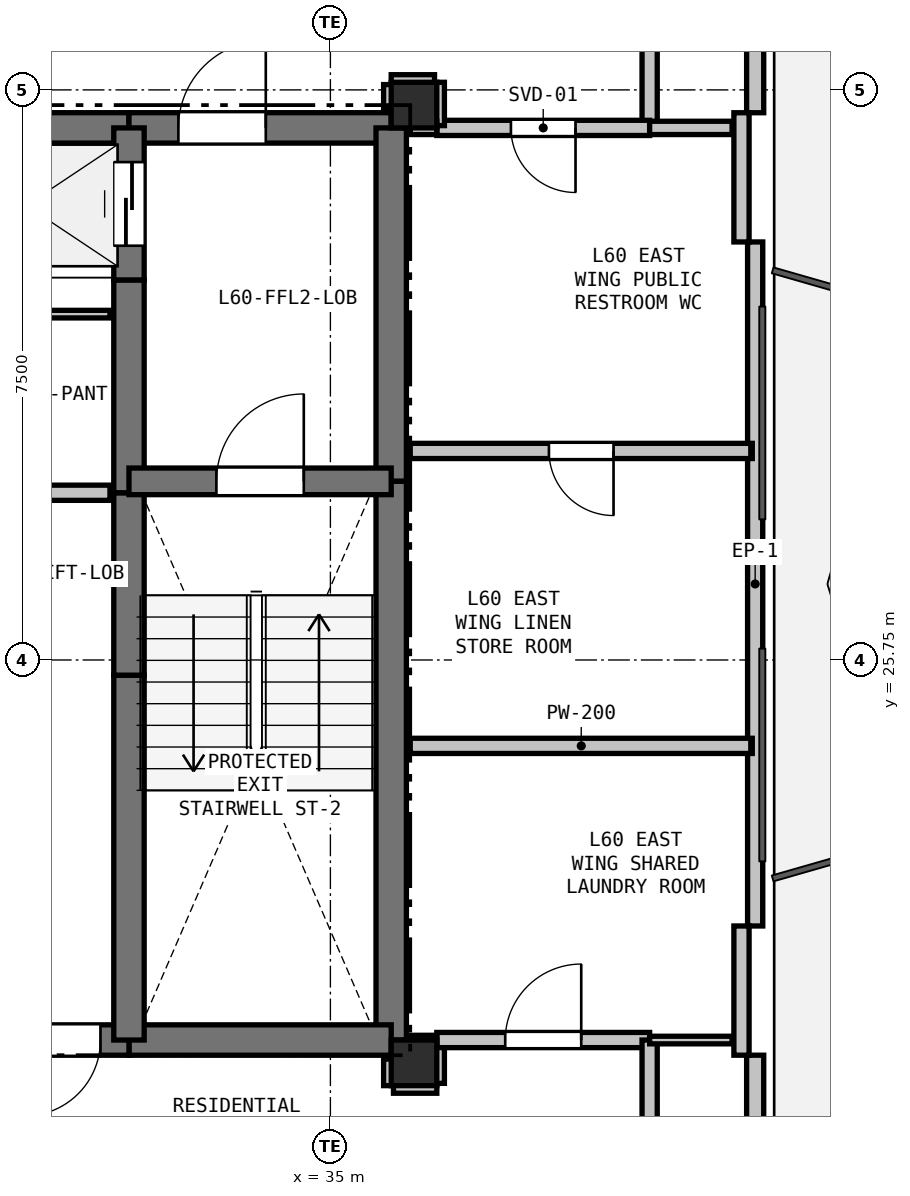
"""IFC4 building model, lengths in metres.
Left out: names, types, materials, properties, quantities, classifications, styles, units other than length and angle.
Written with IfcOpenShell. Run it as: python <this file> out.ifc"""

import sys

from ifc_helpers import new_model, si_unit, direction, frame, frame_2d, origin, origin_2d, place, context, subcontext, project, spatial, rectangle, extrude, element, fill, save


model = new_model("IFC4")
c1 = context("Model", 3, precision=1e-05, world=origin(), true_north=direction((0.0, 1.0)))
c2 = subcontext(c1, "Body", "Model", "MODEL_VIEW")
j1 = project(units=[si_unit("LENGTHUNIT", "METRE"), si_unit("PLANEANGLEUNIT", "RADIAN")], contexts=[c1])
p1 = place(None, origin())
s1 = spatial("IfcSite", under=j1, at=p1, CompositionType="ELEMENT")
p2 = place(p1, origin())
s2 = spatial("IfcBuilding", under=s1, at=p2, CompositionType="ELEMENT")
p3 = place(p2, frame((0.0, 0.0, 215.1)))
s3 = spatial("IfcBuildingStorey", under=s2, at=p3, CompositionType="ELEMENT", Elevation=215.1)
for number, where, z_axis, x_axis in (
    (1, (36.1, 33.05, 0.0), (0.0, 0.0, 1.0), (1.0, 0.0, 0.0)),
    (2, (36.1, 20.45, 0.0), (0.0, 0.0, 1.0), (1.0, 0.0, 0.0)),
):
    element("IfcColumn", number, at=place(p3, frame(where, z_axis=z_axis, x_axis=x_axis)), inside=s3, PredefinedType="COLUMN", context=c2, shape_type="SweptSolid", body=[
        extrude(rectangle(XDim=0.6, YDim=0.6, at=origin_2d()), origin(), (0.0, 0.0, 1.0), 3.3),
    ])
p4 = place(p3, frame((40.588, 42.648, 0.0), z_axis=(0.0, 0.0, 1.0), x_axis=(0.0, -1.0, 0.0)))
e3 = element("IfcWall", 3, at=p4, inside=s3, PredefinedType="SOLIDWALL", context=c2, shape_type="SweptSolid", body=[
    extrude(rectangle(XDim=9.699, YDim=0.225, at=frame_2d((4.85, 0.0))), origin(), (0.0, 0.0, 1.0), 2.64),
])
p5 = place(p4, frame((7.784, 0.0, 0.0)))
e4 = element("IfcOpeningElement", 4, at=p5, cuts=e3, PredefinedType="OPENING", context=c2, shape_type="SweptSolid", body=[
    extrude(rectangle(XDim=1.0, YDim=2.1, at=frame_2d((0.5, 1.05))), frame((0.0, 0.123, 0.0), z_axis=(0.0, -1.0, 0.0), x_axis=(1.0, 0.0, 0.0)), (0.0, 0.0, 1.0), 0.245),
])
p6 = place(p3, frame((40.588, 31.25, 0.0), z_axis=(0.0, 0.0, 1.0), x_axis=(0.0, -1.0, 0.0)))
e5 = element("IfcWall", 5, at=p6, inside=s3, PredefinedType="PARAPET", context=c2, shape_type="SweptSolid", body=[
    extrude(rectangle(XDim=8.999, YDim=0.2, at=frame_2d((4.5, 0.0))), origin(), (0.0, 0.0, 1.0), 0.2),
])
p7 = place(p3, frame((40.588, 20.551, 0.0), z_axis=(0.0, 0.0, 1.0), x_axis=(0.0, -1.0, 0.0)))
e6 = element("IfcWall", 6, at=p7, inside=s3, PredefinedType="SOLIDWALL", context=c2, shape_type="SweptSolid", body=[
    extrude(rectangle(XDim=9.699, YDim=0.225, at=frame_2d((4.85, 0.0))), origin(), (0.0, 0.0, 1.0), 2.64),
])
p8 = place(p7, frame((6.395, 0.0, 0.9)))
e7 = element("IfcOpeningElement", 7, at=p8, cuts=e6, PredefinedType="OPENING", context=c2, shape_type="SweptSolid", body=[
    extrude(rectangle(XDim=1.5, YDim=1.5, at=frame_2d((0.75, 0.75))), frame((0.0, 0.123, 0.0), z_axis=(0.0, -1.0, 0.0), x_axis=(1.0, 0.0, 0.0)), (0.0, 0.0, 1.0), 0.245),
])
for number, where, z_axis, x_axis in (
    (8, (40.408, 32.949, 0.0), (0.0, 0.0, 1.0), (0.0, -1.0, 0.0)),
    (9, (40.408, 22.25, 0.0), (0.0, 0.0, 1.0), (0.0, -1.0, 0.0)),
):
    element("IfcWall", number, at=place(p3, frame(where, z_axis=z_axis, x_axis=x_axis)), inside=s3, PredefinedType="PARAPET", context=c2, shape_type="SweptSolid", body=[
        extrude(rectangle(XDim=1.7, YDim=0.2, at=frame_2d((0.85, 0.0))), origin(), (0.0, 0.0, 1.0), 2.64),
    ])
p9 = place(p3, frame((29.65, 32.75, 0.0), z_axis=(0.0, 0.0, 1.0), x_axis=(1.0, 0.0, 0.0)))
e10 = element("IfcWall", 10, at=p9, inside=s3, PredefinedType="SHEAR", context=c2, shape_type="SweptSolid", body=[
    extrude(rectangle(XDim=2.7, YDim=0.4, at=frame_2d((1.35, 0.0))), origin(), (0.0, 0.0, 1.0), 3.02),
])
p10 = place(p3, frame((32.35, 32.75, 0.0), z_axis=(0.0, 0.0, 1.0), x_axis=(1.0, 0.0, 0.0)))
e11 = element("IfcWall", 11, at=p10, inside=s3, PredefinedType="SHEAR", context=c2, shape_type="SweptSolid", body=[
    extrude(rectangle(XDim=3.45, YDim=0.4, at=frame_2d((1.725, 0.0))), origin(), (0.0, 0.0, 1.0), 3.02),
])
p11 = place(p10, frame((0.65, 0.0, 0.0)))
e12 = element("IfcOpeningElement", 12, at=p11, cuts=e11, PredefinedType="OPENING", context=c2, shape_type="SweptSolid", body=[
    extrude(rectangle(XDim=1.15, YDim=2.15, at=frame_2d((0.575, 1.075))), frame((0.0, 0.21, 0.0), z_axis=(0.0, -1.0, 0.0), x_axis=(1.0, 0.0, 0.0)), (0.0, 0.0, 1.0), 0.42),
])
p12 = place(p3, frame((35.8, 32.75, 0.0), z_axis=(0.0, 0.0, 1.0), x_axis=(0.0, -1.0, 0.0)))
e13 = element("IfcWall", 13, at=p12, inside=s3, PredefinedType="SHEAR", context=c2, shape_type="SweptSolid", body=[
    extrude(rectangle(XDim=4.65, YDim=0.4, at=frame_2d((2.325, 0.0))), origin(), (0.0, 0.0, 1.0), 3.02),
])
p13 = place(p3, frame((35.8, 28.1, 0.0), z_axis=(0.0, 0.0, 1.0), x_axis=(0.0, -1.0, 0.0)))
e14 = element("IfcWall", 14, at=p13, inside=s3, PredefinedType="SHEAR", context=c2, shape_type="SweptSolid", body=[
    extrude(rectangle(XDim=7.35, YDim=0.4, at=frame_2d((3.675, 0.0))), origin(), (0.0, 0.0, 1.0), 3.02),
])
p14 = place(p3, frame((35.8, 20.75, 0.0), z_axis=(0.0, 0.0, 1.0), x_axis=(-1.0, 0.0, 0.0)))
e15 = element("IfcWall", 15, at=p14, inside=s3, PredefinedType="SHEAR", context=c2, shape_type="SweptSolid", body=[
    extrude(rectangle(XDim=3.45, YDim=0.4, at=frame_2d((1.725, 0.0))), origin(), (0.0, 0.0, 1.0), 3.02),
])
p15 = place(p3, frame((32.35, 20.75, 0.0), z_axis=(0.0, 0.0, 1.0), x_axis=(-1.0, 0.0, 0.0)))
e16 = element("IfcWall", 16, at=p15, inside=s3, PredefinedType="SHEAR", context=c2, shape_type="SweptSolid", body=[
    extrude(rectangle(XDim=1.75, YDim=0.4, at=frame_2d((0.875, 0.0))), origin(), (0.0, 0.0, 1.0), 3.02),
])
p16 = place(p15, frame((0.375, 0.0, 0.0)))
e17 = element("IfcOpeningElement", 17, at=p16, cuts=e16, PredefinedType="OPENING", context=c2, shape_type="SweptSolid", body=[
    extrude(rectangle(XDim=1.0, YDim=2.15, at=frame_2d((0.5, 1.075))), frame((0.0, 0.21, 0.0), z_axis=(0.0, -1.0, 0.0), x_axis=(1.0, 0.0, 0.0)), (0.0, 0.0, 1.0), 0.42),
])
p17 = place(p3, frame((32.35, 20.75, 0.0), z_axis=(0.0, 0.0, 1.0), x_axis=(0.0, 1.0, 0.0)))
e18 = element("IfcWall", 18, at=p17, inside=s3, PredefinedType="SHEAR", context=c2, shape_type="SweptSolid", body=[
    extrude(rectangle(XDim=4.8, YDim=0.4, at=frame_2d((2.4, 0.0))), origin(), (0.0, 0.0, 1.0), 3.02),
])
p18 = place(p3, frame((32.35, 25.55, 0.0), z_axis=(0.0, 0.0, 1.0), x_axis=(0.0, 1.0, 0.0)))
e19 = element("IfcWall", 19, at=p18, inside=s3, PredefinedType="SHEAR", context=c2, shape_type="SweptSolid", body=[
    extrude(rectangle(XDim=2.4, YDim=0.4, at=frame_2d((1.2, 0.0))), origin(), (0.0, 0.0, 1.0), 3.02),
])
p19 = place(p3, frame((32.35, 27.95, 0.0), z_axis=(0.0, 0.0, 1.0), x_axis=(0.0, 1.0, 0.0)))
e20 = element("IfcWall", 20, at=p19, inside=s3, PredefinedType="SHEAR", context=c2, shape_type="SweptSolid", body=[
    extrude(rectangle(XDim=2.8, YDim=0.4, at=frame_2d((1.4, 0.0))), origin(), (0.0, 0.0, 1.0), 3.02),
])
p20 = place(p3, frame((32.35, 30.75, 0.0), z_axis=(0.0, 0.0, 1.0), x_axis=(0.0, 1.0, 0.0)))
e21 = element("IfcWall", 21, at=p20, inside=s3, PredefinedType="SHEAR", context=c2, shape_type="SweptSolid", body=[
    extrude(rectangle(XDim=2.0, YDim=0.4, at=frame_2d((1.0, 0.0))), origin(), (0.0, 0.0, 1.0), 3.02),
])
p21 = place(p20, frame((0.45, 0.0, 0.0)))
e22 = element("IfcOpeningElement", 22, at=p21, cuts=e21, PredefinedType="OPENING", context=c2, shape_type="SweptSolid", body=[
    extrude(rectangle(XDim=1.1, YDim=2.15, at=frame_2d((0.55, 1.075))), frame((0.0, 0.21, 0.0), z_axis=(0.0, -1.0, 0.0), x_axis=(1.0, 0.0, 0.0)), (0.0, 0.0, 1.0), 0.42),
])
p22 = place(p3, frame((32.35, 28.1, 0.0), z_axis=(0.0, 0.0, 1.0), x_axis=(1.0, 0.0, 0.0)))
e23 = element("IfcWall", 23, at=p22, inside=s3, PredefinedType="SHEAR", context=c2, shape_type="SweptSolid", body=[
    extrude(rectangle(XDim=3.45, YDim=0.35, at=frame_2d((1.725, 0.0))), origin(), (0.0, 0.0, 1.0), 3.02),
])
p23 = place(p22, frame((1.15, 0.0, 0.0)))
e24 = element("IfcOpeningElement", 24, at=p23, cuts=e23, PredefinedType="OPENING", context=c2, shape_type="SweptSolid", body=[
    extrude(rectangle(XDim=1.15, YDim=2.15, at=frame_2d((0.575, 1.075))), frame((0.0, 0.185, 0.0), z_axis=(0.0, -1.0, 0.0), x_axis=(1.0, 0.0, 0.0)), (0.0, 0.0, 1.0), 0.37),
])
p24 = place(p3, frame((32.1, 30.3, 0.0), z_axis=(0.0, 0.0, 1.0), x_axis=(-1.0, 0.0, 0.0)))
e25 = element("IfcWall", 25, at=p24, inside=s3, PredefinedType="PARTITIONING", context=c2, shape_type="SweptSolid", body=[
    extrude(rectangle(XDim=2.45, YDim=0.1, at=frame_2d((1.225, 0.0))), origin(), (0.0, 0.0, 1.0), 3.02),
])
p25 = place(p3, frame((27.4, 27.95, 0.0), z_axis=(0.0, 0.0, 1.0), x_axis=(1.0, 0.0, 0.0)))
e26 = element("IfcWall", 26, at=p25, inside=s3, PredefinedType="PARTITIONING", context=c2, shape_type="SweptSolid", body=[
    extrude(rectangle(XDim=4.7, YDim=0.2, at=frame_2d((2.35, 0.0))), origin(), (0.0, 0.0, 1.0), 3.02),
])
p26 = place(p25, frame((1.85, 0.0, 0.0)))
e27 = element("IfcOpeningElement", 27, at=p26, cuts=e26, PredefinedType="OPENING", context=c2, shape_type="SweptSolid", body=[
    extrude(rectangle(XDim=1.0, YDim=2.15, at=frame_2d((0.5, 1.075))), frame((0.0, 0.11, 0.0), z_axis=(0.0, -1.0, 0.0), x_axis=(1.0, 0.0, 0.0)), (0.0, 0.0, 1.0), 0.22),
])
p27 = place(p3, frame((39.2, 35.2, 0.0), z_axis=(0.0, 0.0, 1.0), x_axis=(0.0, -1.0, 0.0)))
e28 = element("IfcWall", 28, at=p27, inside=s3, PredefinedType="PARTITIONING", context=c2, shape_type="SweptSolid", body=[
    extrude(rectangle(XDim=2.45, YDim=0.2, at=frame_2d((1.225, 0.0))), origin(), (0.0, 0.0, 1.0), 3.02),
])
p28 = place(p3, frame((39.2, 32.75, 0.0), z_axis=(0.0, 0.0, 1.0), x_axis=(-1.0, 0.0, 0.0)))
e29 = element("IfcWall", 29, at=p28, inside=s3, PredefinedType="PARTITIONING", context=c2, shape_type="SweptSolid", body=[
    extrude(rectangle(XDim=2.8, YDim=0.2, at=frame_2d((1.4, 0.0))), origin(), (0.0, 0.0, 1.0), 3.02),
])
p29 = place(p28, frame((0.975, 0.0, 0.0)))
e30 = element("IfcOpeningElement", 30, at=p29, cuts=e29, PredefinedType="OPENING", context=c2, shape_type="SweptSolid", body=[
    extrude(rectangle(XDim=0.85, YDim=2.1, at=frame_2d((0.425, 1.05))), frame((0.0, 0.11, 0.0), z_axis=(0.0, -1.0, 0.0), x_axis=(1.0, 0.0, 0.0)), (0.0, 0.0, 1.0), 0.22),
])
for number, where, z_axis, x_axis in (
    (31, (36.4, 32.78, 0.0), (0.0, 0.0, 1.0), (0.0, 1.0, 0.0)),
    (32, (36.37, 33.35, 0.0), (0.0, 0.0, 1.0), (-1.0, 0.0, 0.0)),
):
    element("IfcWall", number, at=place(p3, frame(where, z_axis=z_axis, x_axis=x_axis)), inside=s3, PredefinedType="PARTITIONING", context=c2, shape_type="SweptSolid", body=[
        extrude(rectangle(XDim=0.57, YDim=0.2, at=frame_2d((0.285, 0.0))), origin(), (0.0, 0.0, 1.0), 2.468),
    ])
p30 = place(p3, frame((35.8, 33.32, 0.0), z_axis=(0.0, 0.0, 1.0), x_axis=(0.0, -1.0, 0.0)))
e33 = element("IfcWall", 33, at=p30, inside=s3, PredefinedType="PARTITIONING", context=c2, shape_type="SweptSolid", body=[
    extrude(rectangle(XDim=0.32, YDim=0.2, at=frame_2d((0.16, 0.0))), origin(), (0.0, 0.0, 1.0), 2.545),
])
p31 = place(p3, frame((35.8, 20.5, 0.0), z_axis=(0.0, 0.0, 1.0), x_axis=(0.0, -1.0, 0.0)))
e34 = element("IfcWall", 34, at=p31, inside=s3, PredefinedType="PARTITIONING", context=c2, shape_type="SweptSolid", body=[
    extrude(rectangle(XDim=0.35, YDim=0.2, at=frame_2d((0.175, 0.0))), origin(), (0.0, 0.0, 1.0), 2.545),
])
p32 = place(p3, frame((35.83, 20.15, 0.0), z_axis=(0.0, 0.0, 1.0), x_axis=(1.0, 0.0, 0.0)))
e35 = element("IfcWall", 35, at=p32, inside=s3, PredefinedType="PARTITIONING", context=c2, shape_type="SweptSolid", body=[
    extrude(rectangle(XDim=0.57, YDim=0.2, at=frame_2d((0.285, 0.0))), origin(), (0.0, 0.0, 1.0), 2.468),
])
p33 = place(p3, frame((36.4, 20.18, 0.0), z_axis=(0.0, 0.0, 1.0), x_axis=(0.0, 1.0, 0.0)))
e36 = element("IfcWall", 36, at=p33, inside=s3, PredefinedType="PARTITIONING", context=c2, shape_type="SweptSolid", body=[
    extrude(rectangle(XDim=0.57, YDim=0.2, at=frame_2d((0.285, 0.0))), origin(), (0.0, 0.0, 1.0), 3.02),
])
p34 = place(p3, frame((36.4, 20.75, 0.0), z_axis=(0.0, 0.0, 1.0), x_axis=(1.0, 0.0, 0.0)))
e37 = element("IfcWall", 37, at=p34, inside=s3, PredefinedType="PARTITIONING", context=c2, shape_type="SweptSolid", body=[
    extrude(rectangle(XDim=2.8, YDim=0.2, at=frame_2d((1.4, 0.0))), origin(), (0.0, 0.0, 1.0), 3.02),
])
p35 = place(p34, frame((0.9, 0.0, 0.0)))
e38 = element("IfcOpeningElement", 38, at=p35, cuts=e37, PredefinedType="OPENING", context=c2, shape_type="SweptSolid", body=[
    extrude(rectangle(XDim=1.0, YDim=2.15, at=frame_2d((0.5, 1.075))), frame((0.0, 0.11, 0.0), z_axis=(0.0, -1.0, 0.0), x_axis=(1.0, 0.0, 0.0)), (0.0, 0.0, 1.0), 0.22),
])
p36 = place(p3, frame((39.2, 20.75, 0.0), z_axis=(0.0, 0.0, 1.0), x_axis=(0.0, -1.0, 0.0)))
e39 = element("IfcWall", 39, at=p36, inside=s3, PredefinedType="PARTITIONING", context=c2, shape_type="SweptSolid", body=[
    extrude(rectangle(XDim=2.45, YDim=0.2, at=frame_2d((1.225, 0.0))), origin(), (0.0, 0.0, 1.0), 3.02),
])
p37 = place(p3, frame((36.05, 32.75, 0.0), z_axis=(0.0, 0.0, 1.0), x_axis=(1.0, 0.0, 0.0)))
e40 = element("IfcWall", 40, at=p37, inside=s3, PredefinedType="PLUMBINGWALL", context=c2, shape_type="SweptSolid", body=[
    extrude(rectangle(XDim=0.35, YDim=0.175, at=frame_2d((0.175, 0.0))), origin(), (0.0, 0.0, 1.0), 2.545),
])
p38 = place(p3, frame((39.2, 32.75, 0.0), z_axis=(0.0, 0.0, 1.0), x_axis=(1.0, 0.0, 0.0)))
e41 = element("IfcWall", 41, at=p38, inside=s3, PredefinedType="PLUMBINGWALL", context=c2, shape_type="SweptSolid", body=[
    extrude(rectangle(XDim=1.084, YDim=0.175, at=frame_2d((0.542, 0.0))), origin(), (0.0, 0.0, 1.0), 2.365),
])
p39 = place(p3, frame((40.55, 28.5, 0.0), z_axis=(0.0, 0.0, 1.0), x_axis=(-1.0, 0.0, 0.0)))
e42 = element("IfcWall", 42, at=p39, inside=s3, PredefinedType="PARTITIONING", context=c2, shape_type="SweptSolid", body=[
    extrude(rectangle(XDim=4.5, YDim=0.2, at=frame_2d((2.25, 0.0))), origin(), (0.0, 0.0, 1.0), 2.365),
])
p40 = place(p39, frame((1.825, 0.0, 0.0)))
e43 = element("IfcOpeningElement", 43, at=p40, cuts=e42, PredefinedType="OPENING", context=c2, shape_type="SweptSolid", body=[
    extrude(rectangle(XDim=0.85, YDim=2.1, at=frame_2d((0.425, 1.05))), frame((0.0, 0.11, 0.0), z_axis=(0.0, -1.0, 0.0), x_axis=(1.0, 0.0, 0.0)), (0.0, 0.0, 1.0), 0.22),
])
p41 = place(p3, frame((40.284, 20.75, 0.0), z_axis=(0.0, 0.0, 1.0), x_axis=(-1.0, 0.0, 0.0)))
e44 = element("IfcWall", 44, at=p41, inside=s3, PredefinedType="PARTITIONING", context=c2, shape_type="SweptSolid", body=[
    extrude(rectangle(XDim=1.084, YDim=0.1, at=frame_2d((0.542, 0.0))), origin(), (0.0, 0.0, 1.0), 2.365),
])
p42 = place(p3, frame((36.4, 20.75, 0.0), z_axis=(0.0, 0.0, 1.0), x_axis=(-1.0, 0.0, 0.0)))
e45 = element("IfcWall", 45, at=p42, inside=s3, PredefinedType="PARTITIONING", context=c2, shape_type="SweptSolid", body=[
    extrude(rectangle(XDim=0.35, YDim=0.125, at=frame_2d((0.175, 0.0))), origin(), (0.0, 0.0, 1.0), 2.545),
])
p43 = place(p3, frame((36.05, 24.62, 0.0), z_axis=(0.0, 0.0, 1.0), x_axis=(1.0, 0.0, 0.0)))
e46 = element("IfcWall", 46, at=p43, inside=s3, PredefinedType="PARTITIONING", context=c2, shape_type="SweptSolid", body=[
    extrude(rectangle(XDim=4.5, YDim=0.2, at=frame_2d((2.25, 0.0))), origin(), (0.0, 0.0, 1.0), 2.365),
])
p44 = place(p16, origin())
e47 = element("IfcDoor", 47, at=p44, inside=s3, OperationType="SINGLE_SWING_RIGHT", PredefinedType="DOOR", context=c2, shape_type="SweptSolid", body=[
    extrude(rectangle(XDim=1.0, YDim=2.15, at=frame_2d((0.5, 1.075))), frame((0.0, 0.025, 0.0), z_axis=(0.0, -1.0, 0.0), x_axis=(1.0, 0.0, 0.0)), (0.0, 0.0, 1.0), 0.05),
])
fill(e17, e47)
p45 = place(p21, origin())
e48 = element("IfcDoor", 48, at=p45, inside=s3, OperationType="SLIDING_TO_LEFT", PredefinedType="DOOR", context=c2, shape_type="SweptSolid", body=[
    extrude(rectangle(XDim=1.1, YDim=2.15, at=frame_2d((0.55, 1.075))), frame((0.0, 0.025, 0.0), z_axis=(0.0, -1.0, 0.0), x_axis=(1.0, 0.0, 0.0)), (0.0, 0.0, 1.0), 0.05),
])
fill(e22, e48)
p46 = place(p23, origin())
e49 = element("IfcDoor", 49, at=p46, inside=s3, OperationType="SINGLE_SWING_RIGHT", PredefinedType="DOOR", context=c2, shape_type="SweptSolid", body=[
    extrude(rectangle(XDim=1.15, YDim=2.15, at=frame_2d((0.575, 1.075))), frame((0.0, 0.025, 0.0), z_axis=(0.0, -1.0, 0.0), x_axis=(1.0, 0.0, 0.0)), (0.0, 0.0, 1.0), 0.05),
])
fill(e24, e49)
p47 = place(p11, origin())
e50 = element("IfcDoor", 50, at=p47, inside=s3, OperationType="SINGLE_SWING_RIGHT", PredefinedType="DOOR", context=c2, shape_type="SweptSolid", body=[
    extrude(rectangle(XDim=1.15, YDim=2.15, at=frame_2d((0.575, 1.075))), frame((0.0, 0.025, 0.0), z_axis=(0.0, -1.0, 0.0), x_axis=(1.0, 0.0, 0.0)), (0.0, 0.0, 1.0), 0.05),
])
fill(e12, e50)
p48 = place(p29, origin())
e51 = element("IfcDoor", 51, at=p48, inside=s3, OperationType="SINGLE_SWING_LEFT", PredefinedType="DOOR", context=c2, shape_type="SweptSolid", body=[
    extrude(rectangle(XDim=0.85, YDim=2.1, at=frame_2d((0.425, 1.05))), frame((0.0, 0.025, 0.0), z_axis=(0.0, -1.0, 0.0), x_axis=(1.0, 0.0, 0.0)), (0.0, 0.0, 1.0), 0.05),
])
fill(e30, e51)
p49 = place(p35, origin())
e52 = element("IfcDoor", 52, at=p49, inside=s3, OperationType="SINGLE_SWING_RIGHT", PredefinedType="DOOR", context=c2, shape_type="SweptSolid", body=[
    extrude(rectangle(XDim=1.0, YDim=2.15, at=frame_2d((0.5, 1.075))), frame((0.0, 0.025, 0.0), z_axis=(0.0, -1.0, 0.0), x_axis=(1.0, 0.0, 0.0)), (0.0, 0.0, 1.0), 0.05),
])
fill(e38, e52)
p50 = place(p40, origin())
e53 = element("IfcDoor", 53, at=p50, inside=s3, OperationType="SINGLE_SWING_LEFT", PredefinedType="DOOR", context=c2, shape_type="SweptSolid", body=[
    extrude(rectangle(XDim=0.85, YDim=2.1, at=frame_2d((0.425, 1.05))), frame((0.0, 0.025, 0.0), z_axis=(0.0, -1.0, 0.0), x_axis=(1.0, 0.0, 0.0)), (0.0, 0.0, 1.0), 0.05),
])
fill(e43, e53)
save(model, sys.argv[1])
